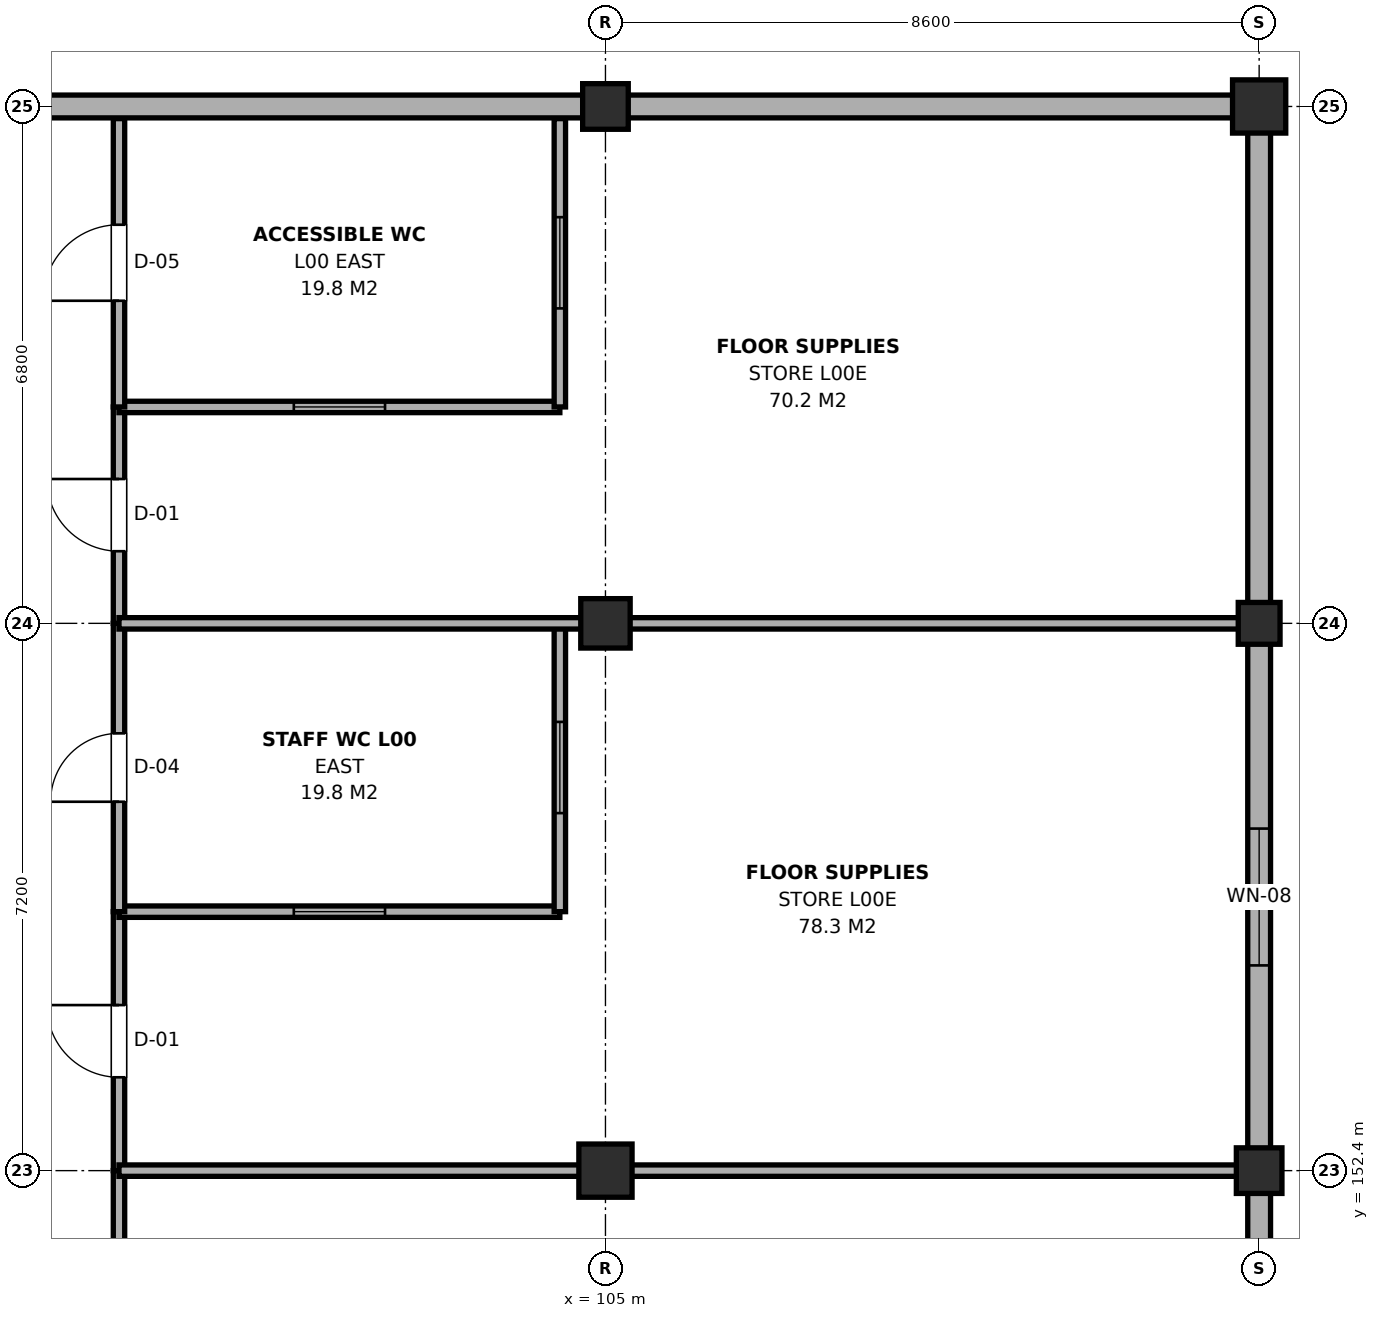
"""IFC4 building model, lengths in metres.
Left out: names, types, materials, properties, quantities, classifications, styles, units other than length and angle.
Written with IfcOpenShell. Run it as: python <this file> out.ifc"""

import sys

from ifc_helpers import new_model, si_unit, direction, frame, frame_2d, origin, origin_2d, place, context, subcontext, project, spatial, rectangle, extrude, element, fill, save


model = new_model("IFC4")
c1 = context("Model", 3, precision=1e-05, world=origin(), true_north=direction((0.0, 1.0)))
c2 = subcontext(c1, "Body", "Model", "MODEL_VIEW")
j1 = project(units=[si_unit("LENGTHUNIT", "METRE"), si_unit("PLANEANGLEUNIT", "RADIAN")], contexts=[c1])
p1 = place(None, origin())
s1 = spatial("IfcSite", under=j1, at=p1, CompositionType="ELEMENT")
p2 = place(p1, origin())
s2 = spatial("IfcBuilding", under=s1, at=p2, CompositionType="ELEMENT")
p3 = place(p2, origin())
s3 = spatial("IfcBuildingStorey", under=s2, at=p3, CompositionType="ELEMENT", Elevation=0.0)
p4 = place(p3, frame((105.0, 152.4, 0.0), z_axis=(0.0, 0.0, 1.0), x_axis=(1.0, 0.0, 0.0)))
e1 = element("IfcColumn", 1, at=p4, inside=s3, PredefinedType="COLUMN", context=c2, shape_type="SweptSolid", body=[
    extrude(rectangle(XDim=0.7, YDim=0.7, at=origin_2d()), origin(), (0.0, 0.0, 1.0), 4.8),
])
p5 = place(p3, frame((105.0, 159.6, 0.0), z_axis=(0.0, 0.0, 1.0), x_axis=(1.0, 0.0, 0.0)))
e2 = element("IfcColumn", 2, at=p5, inside=s3, PredefinedType="COLUMN", context=c2, shape_type="SweptSolid", body=[
    extrude(rectangle(XDim=0.65, YDim=0.65, at=origin_2d()), origin(), (0.0, 0.0, 1.0), 4.8),
])
for number, where, z_axis, x_axis in (
    (3, (105.0, 166.4, 0.0), (0.0, 0.0, 1.0), (1.0, 0.0, 0.0)),
    (4, (113.6, 152.4, 0.0), (0.0, 0.0, 1.0), (1.0, 0.0, 0.0)),
):
    element("IfcColumn", number, at=place(p3, frame(where, z_axis=z_axis, x_axis=x_axis)), inside=s3, PredefinedType="COLUMN", context=c2, shape_type="SweptSolid", body=[
        extrude(rectangle(XDim=0.6, YDim=0.6, at=origin_2d()), origin(), (0.0, 0.0, 1.0), 4.8),
    ])
p6 = place(p3, frame((113.6, 159.6, 0.0), z_axis=(0.0, 0.0, 1.0), x_axis=(1.0, 0.0, 0.0)))
e5 = element("IfcColumn", 5, at=p6, inside=s3, PredefinedType="COLUMN", context=c2, shape_type="SweptSolid", body=[
    extrude(rectangle(XDim=0.55, YDim=0.55, at=origin_2d()), origin(), (0.0, 0.0, 1.0), 4.8),
])
p7 = place(p3, frame((113.6, 166.4, 0.0), z_axis=(0.0, 0.0, 1.0), x_axis=(1.0, 0.0, 0.0)))
e6 = element("IfcColumn", 6, at=p7, inside=s3, PredefinedType="COLUMN", context=c2, shape_type="SweptSolid", body=[
    extrude(rectangle(XDim=0.7, YDim=0.7, at=origin_2d()), origin(), (0.0, 0.0, 1.0), 4.8),
])
p8 = place(p3, frame((113.6, 145.2, 0.0), z_axis=(0.0, 0.0, 1.0), x_axis=(0.0, 1.0, 0.0)))
e7 = element("IfcWall", 7, at=p8, inside=s3, PredefinedType="SOLIDWALL", context=c2, shape_type="SweptSolid", body=[
    extrude(rectangle(XDim=7.2, YDim=0.3, at=frame_2d((3.6, 0.0))), origin(), (0.0, 0.0, 1.0), 4.005),
])
p9 = place(p8, frame((2.7, 0.0, 1.1)))
e8 = element("IfcOpeningElement", 8, at=p9, cuts=e7, PredefinedType="OPENING", context=c2, shape_type="SweptSolid", body=[
    extrude(rectangle(XDim=1.8, YDim=1.2, at=frame_2d((0.9, 0.6))), frame((0.0, 0.165, 0.0), z_axis=(0.0, -1.0, 0.0), x_axis=(1.0, 0.0, 0.0)), (0.0, 0.0, 1.0), 0.33),
])
p10 = place(p3, frame((113.6, 152.4, 0.0), z_axis=(0.0, 0.0, 1.0), x_axis=(0.0, 1.0, 0.0)))
e9 = element("IfcWall", 9, at=p10, inside=s3, PredefinedType="SOLIDWALL", context=c2, shape_type="SweptSolid", body=[
    extrude(rectangle(XDim=7.2, YDim=0.3, at=frame_2d((3.6, 0.0))), origin(), (0.0, 0.0, 1.0), 4.055),
])
p11 = place(p10, frame((2.7, 0.0, 1.1)))
e10 = element("IfcOpeningElement", 10, at=p11, cuts=e9, PredefinedType="OPENING", context=c2, shape_type="SweptSolid", body=[
    extrude(rectangle(XDim=1.8, YDim=1.2, at=frame_2d((0.9, 0.6))), frame((0.0, 0.165, 0.0), z_axis=(0.0, -1.0, 0.0), x_axis=(1.0, 0.0, 0.0)), (0.0, 0.0, 1.0), 0.33),
])
p12 = place(p3, frame((113.6, 159.6, 0.0), z_axis=(0.0, 0.0, 1.0), x_axis=(0.0, 1.0, 0.0)))
e11 = element("IfcWall", 11, at=p12, inside=s3, PredefinedType="SOLIDWALL", context=c2, shape_type="SweptSolid", body=[
    extrude(rectangle(XDim=6.95, YDim=0.3, at=frame_2d((3.475, 0.0))), origin(), (0.0, 0.0, 1.0), 4.105),
])
p13 = place(p3, frame((96.0, 166.4, 0.0), z_axis=(0.0, 0.0, 1.0), x_axis=(1.0, 0.0, 0.0)))
e12 = element("IfcWall", 12, at=p13, inside=s3, PredefinedType="SOLIDWALL", context=c2, shape_type="SweptSolid", body=[
    extrude(rectangle(XDim=9.0, YDim=0.3, at=frame_2d((4.5, 0.0))), origin(), (0.0, 0.0, 1.0), 4.165),
])
p14 = place(p3, frame((105.0, 166.4, 0.0), z_axis=(0.0, 0.0, 1.0), x_axis=(1.0, 0.0, 0.0)))
e13 = element("IfcWall", 13, at=p14, inside=s3, PredefinedType="SOLIDWALL", context=c2, shape_type="SweptSolid", body=[
    extrude(rectangle(XDim=8.75, YDim=0.3, at=frame_2d((4.375, 0.0))), origin(), (0.0, 0.0, 1.0), 4.165),
])
p15 = place(p3, frame((98.6, 142.2, 0.0), z_axis=(0.0, 0.0, 1.0), x_axis=(0.0, 1.0, 0.0)))
e14 = element("IfcWall", 14, at=p15, inside=s3, PredefinedType="PARTITIONING", context=c2, shape_type="SweptSolid", body=[
    extrude(rectangle(XDim=10.2, YDim=0.15, at=frame_2d((5.1, 0.0))), origin(), (0.0, 0.0, 1.0), 4.065),
])
p16 = place(p15, frame((4.575, 0.0, 0.0)))
e15 = element("IfcOpeningElement", 15, at=p16, cuts=e14, PredefinedType="OPENING", context=c2, shape_type="SweptSolid", body=[
    extrude(rectangle(XDim=1.05, YDim=2.15, at=frame_2d((0.525, 1.075))), frame((0.0, 0.09, 0.0), z_axis=(0.0, -1.0, 0.0), x_axis=(1.0, 0.0, 0.0)), (0.0, 0.0, 1.0), 0.18),
])
p17 = place(p15, frame((6.044, 0.0, 0.95)))
e16 = element("IfcOpeningElement", 16, at=p17, cuts=e14, PredefinedType="OPENING", context=c2, shape_type="SweptSolid", body=[
    extrude(rectangle(XDim=2.6, YDim=1.5, at=frame_2d((1.3, 0.75))), frame((0.0, 0.09, 0.0), z_axis=(0.0, -1.0, 0.0), x_axis=(1.0, 0.0, 0.0)), (0.0, 0.0, 1.0), 0.18),
])
p18 = place(p3, frame((98.6, 152.4, 0.0), z_axis=(0.0, 0.0, 1.0), x_axis=(0.0, 1.0, 0.0)))
e17 = element("IfcWall", 17, at=p18, inside=s3, PredefinedType="PARTITIONING", context=c2, shape_type="SweptSolid", body=[
    extrude(rectangle(XDim=3.407, YDim=0.15, at=frame_2d((1.704, 0.0))), origin(), (0.0, 0.0, 1.0), 4.065),
])
p19 = place(p18, frame((1.228, 0.0, 0.0)))
e18 = element("IfcOpeningElement", 18, at=p19, cuts=e17, PredefinedType="OPENING", context=c2, shape_type="SweptSolid", body=[
    extrude(rectangle(XDim=0.95, YDim=2.15, at=frame_2d((0.475, 1.075))), frame((0.0, 0.09, 0.0), z_axis=(0.0, -1.0, 0.0), x_axis=(1.0, 0.0, 0.0)), (0.0, 0.0, 1.0), 0.18),
])
p20 = place(p3, frame((98.6, 155.807, 0.0), z_axis=(0.0, 0.0, 1.0), x_axis=(1.0, 0.0, 0.0)))
e19 = element("IfcWall", 19, at=p20, inside=s3, PredefinedType="PARTITIONING", context=c2, shape_type="SweptSolid", body=[
    extrude(rectangle(XDim=5.8, YDim=0.15, at=frame_2d((2.9, 0.0))), origin(), (0.0, 0.0, 1.0), 4.555),
])
p21 = place(p20, frame((2.3, 0.0, 0.95)))
e20 = element("IfcOpeningElement", 20, at=p21, cuts=e19, PredefinedType="OPENING", context=c2, shape_type="SweptSolid", body=[
    extrude(rectangle(XDim=1.2, YDim=1.5, at=frame_2d((0.6, 0.75))), frame((0.0, 0.09, 0.0), z_axis=(0.0, -1.0, 0.0), x_axis=(1.0, 0.0, 0.0)), (0.0, 0.0, 1.0), 0.18),
])
p22 = place(p3, frame((104.4, 155.807, 0.0), z_axis=(0.0, 0.0, 1.0), x_axis=(0.0, 1.0, 0.0)))
e21 = element("IfcWall", 21, at=p22, inside=s3, PredefinedType="PARTITIONING", context=c2, shape_type="SweptSolid", body=[
    extrude(rectangle(XDim=3.793, YDim=0.15, at=frame_2d((1.896, 0.0))), origin(), (0.0, 0.0, 1.0), 3.965),
])
p23 = place(p22, frame((1.296, 0.0, 0.95)))
e22 = element("IfcOpeningElement", 22, at=p23, cuts=e21, PredefinedType="OPENING", context=c2, shape_type="SweptSolid", body=[
    extrude(rectangle(XDim=1.2, YDim=1.5, at=frame_2d((0.6, 0.75))), frame((0.0, 0.09, 0.0), z_axis=(0.0, -1.0, 0.0), x_axis=(1.0, 0.0, 0.0)), (0.0, 0.0, 1.0), 0.18),
])
p24 = place(p3, frame((98.6, 155.807, 0.0), z_axis=(0.0, 0.0, 1.0), x_axis=(0.0, 1.0, 0.0)))
e23 = element("IfcWall", 23, at=p24, inside=s3, PredefinedType="PARTITIONING", context=c2, shape_type="SweptSolid", body=[
    extrude(rectangle(XDim=3.793, YDim=0.15, at=frame_2d((1.896, 0.0))), origin(), (0.0, 0.0, 1.0), 3.965),
])
p25 = place(p24, frame((1.446, 0.0, 0.0)))
e24 = element("IfcOpeningElement", 24, at=p25, cuts=e23, PredefinedType="OPENING", context=c2, shape_type="SweptSolid", body=[
    extrude(rectangle(XDim=0.9, YDim=2.15, at=frame_2d((0.45, 1.075))), frame((0.0, 0.09, 0.0), z_axis=(0.0, -1.0, 0.0), x_axis=(1.0, 0.0, 0.0)), (0.0, 0.0, 1.0), 0.18),
])
p26 = place(p3, frame((98.6, 152.4, 0.0), z_axis=(0.0, 0.0, 1.0), x_axis=(1.0, 0.0, 0.0)))
e25 = element("IfcWall", 25, at=p26, inside=s3, PredefinedType="PARTITIONING", context=c2, shape_type="SweptSolid", body=[
    extrude(rectangle(XDim=14.84, YDim=0.15, at=frame_2d((7.42, 0.0))), origin(), (0.0, 0.0, 1.0), 4.065),
])
p27 = place(p3, frame((98.6, 159.6, 0.0), z_axis=(0.0, 0.0, 1.0), x_axis=(0.0, 1.0, 0.0)))
e26 = element("IfcWall", 26, at=p27, inside=s3, PredefinedType="PARTITIONING", context=c2, shape_type="SweptSolid", body=[
    extrude(rectangle(XDim=2.847, YDim=0.15, at=frame_2d((1.423, 0.0))), origin(), (0.0, 0.0, 1.0), 3.965),
])
p28 = place(p27, frame((0.949, 0.0, 0.0)))
e27 = element("IfcOpeningElement", 27, at=p28, cuts=e26, PredefinedType="OPENING", context=c2, shape_type="SweptSolid", body=[
    extrude(rectangle(XDim=0.95, YDim=2.15, at=frame_2d((0.475, 1.075))), frame((0.0, 0.09, 0.0), z_axis=(0.0, -1.0, 0.0), x_axis=(1.0, 0.0, 0.0)), (0.0, 0.0, 1.0), 0.18),
])
p29 = place(p3, frame((98.6, 162.447, 0.0), z_axis=(0.0, 0.0, 1.0), x_axis=(1.0, 0.0, 0.0)))
e28 = element("IfcWall", 28, at=p29, inside=s3, PredefinedType="PARTITIONING", context=c2, shape_type="SweptSolid", body=[
    extrude(rectangle(XDim=5.8, YDim=0.15, at=frame_2d((2.9, 0.0))), origin(), (0.0, 0.0, 1.0), 4.555),
])
p30 = place(p29, frame((2.3, 0.0, 0.95)))
e29 = element("IfcOpeningElement", 29, at=p30, cuts=e28, PredefinedType="OPENING", context=c2, shape_type="SweptSolid", body=[
    extrude(rectangle(XDim=1.2, YDim=1.5, at=frame_2d((0.6, 0.75))), frame((0.0, 0.09, 0.0), z_axis=(0.0, -1.0, 0.0), x_axis=(1.0, 0.0, 0.0)), (0.0, 0.0, 1.0), 0.18),
])
p31 = place(p3, frame((104.4, 162.447, 0.0), z_axis=(0.0, 0.0, 1.0), x_axis=(0.0, 1.0, 0.0)))
e30 = element("IfcWall", 30, at=p31, inside=s3, PredefinedType="PARTITIONING", context=c2, shape_type="SweptSolid", body=[
    extrude(rectangle(XDim=3.793, YDim=0.15, at=frame_2d((1.896, 0.0))), origin(), (0.0, 0.0, 1.0), 4.165),
])
p32 = place(p31, frame((1.296, 0.0, 0.95)))
e31 = element("IfcOpeningElement", 31, at=p32, cuts=e30, PredefinedType="OPENING", context=c2, shape_type="SweptSolid", body=[
    extrude(rectangle(XDim=1.2, YDim=1.5, at=frame_2d((0.6, 0.75))), frame((0.0, 0.09, 0.0), z_axis=(0.0, -1.0, 0.0), x_axis=(1.0, 0.0, 0.0)), (0.0, 0.0, 1.0), 0.18),
])
p33 = place(p3, frame((98.6, 162.447, 0.0), z_axis=(0.0, 0.0, 1.0), x_axis=(0.0, 1.0, 0.0)))
e32 = element("IfcWall", 32, at=p33, inside=s3, PredefinedType="PARTITIONING", context=c2, shape_type="SweptSolid", body=[
    extrude(rectangle(XDim=3.793, YDim=0.15, at=frame_2d((1.896, 0.0))), origin(), (0.0, 0.0, 1.0), 4.165),
])
p34 = place(p33, frame((1.397, 0.0, 0.0)))
e33 = element("IfcOpeningElement", 33, at=p34, cuts=e32, PredefinedType="OPENING", context=c2, shape_type="SweptSolid", body=[
    extrude(rectangle(XDim=1.0, YDim=2.15, at=frame_2d((0.5, 1.075))), frame((0.0, 0.09, 0.0), z_axis=(0.0, -1.0, 0.0), x_axis=(1.0, 0.0, 0.0)), (0.0, 0.0, 1.0), 0.18),
])
p35 = place(p3, frame((98.6, 159.6, 0.0), z_axis=(0.0, 0.0, 1.0), x_axis=(1.0, 0.0, 0.0)))
e34 = element("IfcWall", 34, at=p35, inside=s3, PredefinedType="PARTITIONING", context=c2, shape_type="SweptSolid", body=[
    extrude(rectangle(XDim=14.84, YDim=0.15, at=frame_2d((7.42, 0.0))), origin(), (0.0, 0.0, 1.0), 3.965),
])
p36 = place(p11, origin())
e35 = element("IfcWindow", 35, at=p36, inside=s3, PartitioningType="SINGLE_PANEL", PredefinedType="WINDOW", context=c2, shape_type="SweptSolid", body=[
    extrude(rectangle(XDim=1.8, YDim=1.2, at=frame_2d((0.9, 0.6))), frame((0.0, 0.03, 0.0), z_axis=(0.0, -1.0, 0.0), x_axis=(1.0, 0.0, 0.0)), (0.0, 0.0, 1.0), 0.06),
])
fill(e10, e35)
p37 = place(p19, origin())
e36 = element("IfcDoor", 36, at=p37, inside=s3, OperationType="SINGLE_SWING_RIGHT", PredefinedType="DOOR", context=c2, shape_type="SweptSolid", body=[
    extrude(rectangle(XDim=0.95, YDim=2.15, at=frame_2d((0.475, 1.075))), frame((0.0, 0.025, 0.0), z_axis=(0.0, -1.0, 0.0), x_axis=(1.0, 0.0, 0.0)), (0.0, 0.0, 1.0), 0.05),
])
fill(e18, e36)
p38 = place(p21, origin())
e37 = element("IfcWindow", 37, at=p38, inside=s3, PartitioningType="SINGLE_PANEL", PredefinedType="WINDOW", context=c2, shape_type="SweptSolid", body=[
    extrude(rectangle(XDim=1.2, YDim=1.5, at=frame_2d((0.6, 0.75))), frame((0.0, 0.03, 0.0), z_axis=(0.0, -1.0, 0.0), x_axis=(1.0, 0.0, 0.0)), (0.0, 0.0, 1.0), 0.06),
])
fill(e20, e37)
p39 = place(p23, origin())
e38 = element("IfcWindow", 38, at=p39, inside=s3, PartitioningType="SINGLE_PANEL", PredefinedType="WINDOW", context=c2, shape_type="SweptSolid", body=[
    extrude(rectangle(XDim=1.2, YDim=1.5, at=frame_2d((0.6, 0.75))), frame((0.0, 0.03, 0.0), z_axis=(0.0, -1.0, 0.0), x_axis=(1.0, 0.0, 0.0)), (0.0, 0.0, 1.0), 0.06),
])
fill(e22, e38)
p40 = place(p25, origin())
e39 = element("IfcDoor", 39, at=p40, inside=s3, OperationType="SINGLE_SWING_LEFT", PredefinedType="DOOR", context=c2, shape_type="SweptSolid", body=[
    extrude(rectangle(XDim=0.9, YDim=2.15, at=frame_2d((0.45, 1.075))), frame((0.0, 0.025, 0.0), z_axis=(0.0, -1.0, 0.0), x_axis=(1.0, 0.0, 0.0)), (0.0, 0.0, 1.0), 0.05),
])
fill(e24, e39)
p41 = place(p28, origin())
e40 = element("IfcDoor", 40, at=p41, inside=s3, OperationType="SINGLE_SWING_RIGHT", PredefinedType="DOOR", context=c2, shape_type="SweptSolid", body=[
    extrude(rectangle(XDim=0.95, YDim=2.15, at=frame_2d((0.475, 1.075))), frame((0.0, 0.025, 0.0), z_axis=(0.0, -1.0, 0.0), x_axis=(1.0, 0.0, 0.0)), (0.0, 0.0, 1.0), 0.05),
])
fill(e27, e40)
p42 = place(p30, origin())
e41 = element("IfcWindow", 41, at=p42, inside=s3, PartitioningType="SINGLE_PANEL", PredefinedType="WINDOW", context=c2, shape_type="SweptSolid", body=[
    extrude(rectangle(XDim=1.2, YDim=1.5, at=frame_2d((0.6, 0.75))), frame((0.0, 0.03, 0.0), z_axis=(0.0, -1.0, 0.0), x_axis=(1.0, 0.0, 0.0)), (0.0, 0.0, 1.0), 0.06),
])
fill(e29, e41)
p43 = place(p32, origin())
e42 = element("IfcWindow", 42, at=p43, inside=s3, PartitioningType="SINGLE_PANEL", PredefinedType="WINDOW", context=c2, shape_type="SweptSolid", body=[
    extrude(rectangle(XDim=1.2, YDim=1.5, at=frame_2d((0.6, 0.75))), frame((0.0, 0.03, 0.0), z_axis=(0.0, -1.0, 0.0), x_axis=(1.0, 0.0, 0.0)), (0.0, 0.0, 1.0), 0.06),
])
fill(e31, e42)
p44 = place(p34, origin())
e43 = element("IfcDoor", 43, at=p44, inside=s3, OperationType="SINGLE_SWING_LEFT", PredefinedType="DOOR", context=c2, shape_type="SweptSolid", body=[
    extrude(rectangle(XDim=1.0, YDim=2.15, at=frame_2d((0.5, 1.075))), frame((0.0, 0.025, 0.0), z_axis=(0.0, -1.0, 0.0), x_axis=(1.0, 0.0, 0.0)), (0.0, 0.0, 1.0), 0.05),
])
fill(e33, e43)
save(model, sys.argv[1])
